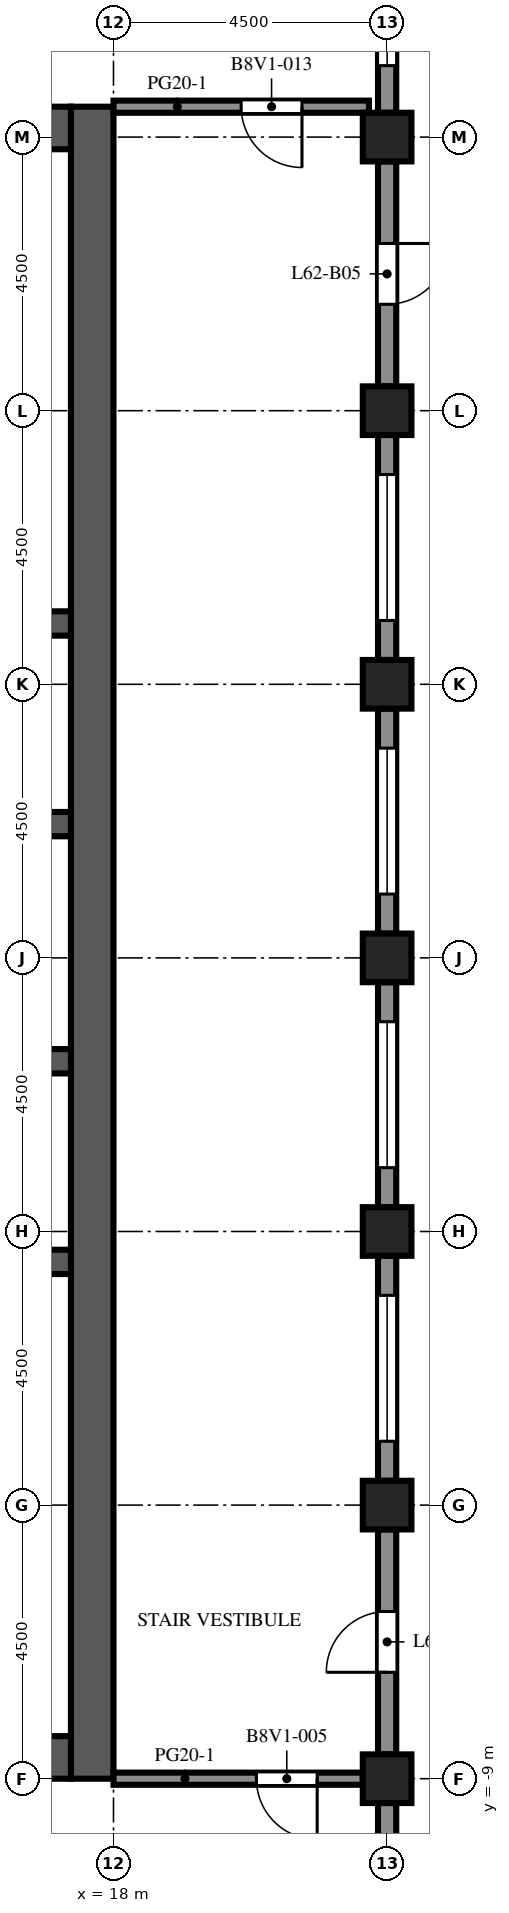
"""IFC4 building model, lengths in metres.
Left out: names, types, materials, properties, quantities, classifications, styles, units other than length and angle.
Written with IfcOpenShell. Run it as: python <this file> out.ifc"""

import sys

from ifc_helpers import new_model, si_unit, direction, frame, frame_2d, origin, origin_2d, place, context, subcontext, project, spatial, rectangle, extrude, element, fill, save


model = new_model("IFC4")
c1 = context("Model", 3, precision=1e-05, world=origin(), true_north=direction((0.0, 1.0)))
c2 = subcontext(c1, "Body", "Model", "MODEL_VIEW")
j1 = project(units=[si_unit("LENGTHUNIT", "METRE"), si_unit("PLANEANGLEUNIT", "RADIAN")], contexts=[c1])
p1 = place(None, origin())
s1 = spatial("IfcSite", under=j1, at=p1, CompositionType="ELEMENT")
p2 = place(p1, origin())
s2 = spatial("IfcBuilding", under=s1, at=p2, CompositionType="ELEMENT")
p3 = place(p2, frame((0.0, 0.0, 274.5)))
s3 = spatial("IfcBuildingStorey", under=s2, at=p3, CompositionType="ELEMENT", Elevation=274.5)
for number, where, z_axis, x_axis in (
    (1, (22.5, -9.0, 0.0), (0.0, 0.0, 1.0), (1.0, 0.0, 0.0)),
    (2, (22.5, -4.5, 0.0), (0.0, 0.0, 1.0), (1.0, 0.0, 0.0)),
    (3, (22.5, 0.0, 0.0), (0.0, 0.0, 1.0), (1.0, 0.0, 0.0)),
    (4, (22.5, 4.5, 0.0), (0.0, 0.0, 1.0), (1.0, 0.0, 0.0)),
    (5, (22.5, 9.0, 0.0), (0.0, 0.0, 1.0), (1.0, 0.0, 0.0)),
    (6, (22.5, 13.5, 0.0), (0.0, 0.0, 1.0), (1.0, 0.0, 0.0)),
    (7, (22.5, 18.0, 0.0), (0.0, 0.0, 1.0), (1.0, 0.0, 0.0)),
):
    element("IfcColumn", number, at=place(p3, frame(where, z_axis=z_axis, x_axis=x_axis)), inside=s3, PredefinedType="COLUMN", context=c2, shape_type="SweptSolid", body=[
        extrude(rectangle(XDim=0.8, YDim=0.8, at=origin_2d()), origin(), (0.0, 0.0, 1.0), 4.1),
    ])
p4 = place(p3, frame((17.65, -9.0, 0.0), z_axis=(0.0, 0.0, 1.0), x_axis=(0.0, 1.0, 0.0)))
e8 = element("IfcWall", 8, at=p4, inside=s3, PredefinedType="SHEAR", context=c2, shape_type="SweptSolid", body=[
    extrude(rectangle(XDim=27.5, YDim=0.7, at=frame_2d((13.75, 0.0))), origin(), (0.0, 0.0, 1.0), 4.1),
])
p5 = place(p4, frame((12.55, 0.0, 0.0)))
e9 = element("IfcOpeningElement", 9, at=p5, cuts=e8, PredefinedType="OPENING", context=c2, shape_type="SweptSolid", body=[
    extrude(rectangle(XDim=2.4, YDim=2.4, at=frame_2d((1.2, 1.2))), frame((0.0, 0.36, 0.0), z_axis=(0.0, -1.0, 0.0), x_axis=(1.0, 0.0, 0.0)), (0.0, 0.0, 1.0), 0.72),
])
p6 = place(p4, frame((6.825, 0.0, 0.0)))
e10 = element("IfcOpeningElement", 10, at=p6, cuts=e8, PredefinedType="OPENING", context=c2, shape_type="SweptSolid", body=[
    extrude(rectangle(XDim=1.2, YDim=2.1, at=frame_2d((0.6, 1.05))), frame((0.0, 0.36, 0.0), z_axis=(0.0, -1.0, 0.0), x_axis=(1.0, 0.0, 0.0)), (0.0, 0.0, 1.0), 0.72),
])
p7 = place(p4, frame((19.475, 0.0, 0.0)))
e11 = element("IfcOpeningElement", 11, at=p7, cuts=e8, PredefinedType="OPENING", context=c2, shape_type="SweptSolid", body=[
    extrude(rectangle(XDim=1.2, YDim=2.1, at=frame_2d((0.6, 1.05))), frame((0.0, 0.36, 0.0), z_axis=(0.0, -1.0, 0.0), x_axis=(1.0, 0.0, 0.0)), (0.0, 0.0, 1.0), 0.72),
])
for number, where, z_axis, x_axis in (
    (12, (6.7, -8.65, 0.0), (0.0, 0.0, 1.0), (1.0, 0.0, 0.0)),
    (13, (6.7, 18.15, 0.0), (0.0, 0.0, 1.0), (1.0, 0.0, 0.0)),
):
    element("IfcWall", number, at=place(p3, frame(where, z_axis=z_axis, x_axis=x_axis)), inside=s3, PredefinedType="SHEAR", context=c2, shape_type="SweptSolid", body=[
        extrude(rectangle(XDim=10.6, YDim=0.7, at=frame_2d((5.3, 0.0))), origin(), (0.0, 0.0, 1.0), 4.1),
    ])
p8 = place(p3, frame((6.7, -0.5, 0.0), z_axis=(0.0, 0.0, 1.0), x_axis=(1.0, 0.0, 0.0)))
e14 = element("IfcWall", 14, at=p8, inside=s3, PredefinedType="SHEAR", context=c2, shape_type="SweptSolid", body=[
    extrude(rectangle(XDim=10.6, YDim=0.4, at=frame_2d((5.3, 0.0))), origin(), (0.0, 0.0, 1.0), 4.1),
])
p9 = place(p3, frame((6.7, 2.8, 0.0), z_axis=(0.0, 0.0, 1.0), x_axis=(1.0, 0.0, 0.0)))
e15 = element("IfcWall", 15, at=p9, inside=s3, PredefinedType="SHEAR", context=c2, shape_type="SweptSolid", body=[
    extrude(rectangle(XDim=10.6, YDim=0.4, at=frame_2d((5.3, 0.0))), origin(), (0.0, 0.0, 1.0), 4.1),
])
p10 = place(p9, frame((0.688, 0.0, 0.0)))
e16 = element("IfcOpeningElement", 16, at=p10, cuts=e15, PredefinedType="OPENING", context=c2, shape_type="SweptSolid", body=[
    extrude(rectangle(XDim=1.1, YDim=2.1, at=frame_2d((0.55, 1.05))), frame((0.0, 0.21, 0.0), z_axis=(0.0, -1.0, 0.0), x_axis=(1.0, 0.0, 0.0)), (0.0, 0.0, 1.0), 0.42),
])
p11 = place(p9, frame((3.438, 0.0, 0.0)))
e17 = element("IfcOpeningElement", 17, at=p11, cuts=e15, PredefinedType="OPENING", context=c2, shape_type="SweptSolid", body=[
    extrude(rectangle(XDim=1.1, YDim=2.1, at=frame_2d((0.55, 1.05))), frame((0.0, 0.21, 0.0), z_axis=(0.0, -1.0, 0.0), x_axis=(1.0, 0.0, 0.0)), (0.0, 0.0, 1.0), 0.42),
])
p12 = place(p9, frame((6.113, 0.0, 0.0)))
e18 = element("IfcOpeningElement", 18, at=p12, cuts=e15, PredefinedType="OPENING", context=c2, shape_type="SweptSolid", body=[
    extrude(rectangle(XDim=1.0, YDim=2.1, at=frame_2d((0.5, 1.05))), frame((0.0, 0.21, 0.0), z_axis=(0.0, -1.0, 0.0), x_axis=(1.0, 0.0, 0.0)), (0.0, 0.0, 1.0), 0.42),
])
p13 = place(p9, frame((8.863, 0.0, 0.0)))
e19 = element("IfcOpeningElement", 19, at=p13, cuts=e15, PredefinedType="OPENING", context=c2, shape_type="SweptSolid", body=[
    extrude(rectangle(XDim=1.0, YDim=2.1, at=frame_2d((0.5, 1.05))), frame((0.0, 0.21, 0.0), z_axis=(0.0, -1.0, 0.0), x_axis=(1.0, 0.0, 0.0)), (0.0, 0.0, 1.0), 0.42),
])
p14 = place(p3, frame((6.7, 6.7, 0.0), z_axis=(0.0, 0.0, 1.0), x_axis=(1.0, 0.0, 0.0)))
e20 = element("IfcWall", 20, at=p14, inside=s3, PredefinedType="SHEAR", context=c2, shape_type="SweptSolid", body=[
    extrude(rectangle(XDim=10.6, YDim=0.4, at=frame_2d((5.3, 0.0))), origin(), (0.0, 0.0, 1.0), 4.1),
])
p15 = place(p14, frame((3.438, 0.0, 0.0)))
e21 = element("IfcOpeningElement", 21, at=p15, cuts=e20, PredefinedType="OPENING", context=c2, shape_type="SweptSolid", body=[
    extrude(rectangle(XDim=1.1, YDim=2.1, at=frame_2d((0.55, 1.05))), frame((0.0, 0.21, 0.0), z_axis=(0.0, -1.0, 0.0), x_axis=(1.0, 0.0, 0.0)), (0.0, 0.0, 1.0), 0.42),
])
p16 = place(p14, frame((6.062, 0.0, 0.0)))
e22 = element("IfcOpeningElement", 22, at=p16, cuts=e20, PredefinedType="OPENING", context=c2, shape_type="SweptSolid", body=[
    extrude(rectangle(XDim=1.1, YDim=2.1, at=frame_2d((0.55, 1.05))), frame((0.0, 0.21, 0.0), z_axis=(0.0, -1.0, 0.0), x_axis=(1.0, 0.0, 0.0)), (0.0, 0.0, 1.0), 0.42),
])
p17 = place(p14, frame((8.812, 0.0, 0.0)))
e23 = element("IfcOpeningElement", 23, at=p17, cuts=e20, PredefinedType="OPENING", context=c2, shape_type="SweptSolid", body=[
    extrude(rectangle(XDim=1.1, YDim=2.1, at=frame_2d((0.55, 1.05))), frame((0.0, 0.21, 0.0), z_axis=(0.0, -1.0, 0.0), x_axis=(1.0, 0.0, 0.0)), (0.0, 0.0, 1.0), 0.42),
])
p18 = place(p14, frame((0.738, 0.0, 0.0)))
e24 = element("IfcOpeningElement", 24, at=p18, cuts=e20, PredefinedType="OPENING", context=c2, shape_type="SweptSolid", body=[
    extrude(rectangle(XDim=1.0, YDim=2.1, at=frame_2d((0.5, 1.05))), frame((0.0, 0.21, 0.0), z_axis=(0.0, -1.0, 0.0), x_axis=(1.0, 0.0, 0.0)), (0.0, 0.0, 1.0), 0.42),
])
p19 = place(p3, frame((6.7, 10.0, 0.0), z_axis=(0.0, 0.0, 1.0), x_axis=(1.0, 0.0, 0.0)))
e25 = element("IfcWall", 25, at=p19, inside=s3, PredefinedType="SHEAR", context=c2, shape_type="SweptSolid", body=[
    extrude(rectangle(XDim=10.6, YDim=0.4, at=frame_2d((5.3, 0.0))), origin(), (0.0, 0.0, 1.0), 4.1),
])
p20 = place(p3, frame((22.5, -9.4, 0.0), z_axis=(0.0, 0.0, 1.0), x_axis=(0.0, -1.0, 0.0)))
e26 = element("IfcWall", 26, at=p20, inside=s3, PredefinedType="SOLIDWALL", context=c2, shape_type="SweptSolid", body=[
    extrude(rectangle(XDim=3.7, YDim=0.3, at=frame_2d((1.85, 0.0))), origin(), (0.0, 0.0, 1.0), 2.85),
])
p21 = place(p20, frame((0.65, 0.0, 0.8)))
e27 = element("IfcOpeningElement", 27, at=p21, cuts=e26, PredefinedType="OPENING", context=c2, shape_type="SweptSolid", body=[
    extrude(rectangle(XDim=2.4, YDim=1.7, at=frame_2d((1.2, 0.85))), frame((0.0, 0.16, 0.0), z_axis=(0.0, -1.0, 0.0), x_axis=(1.0, 0.0, 0.0)), (0.0, 0.0, 1.0), 0.32),
])
p22 = place(p3, frame((22.5, -4.9, 0.0), z_axis=(0.0, 0.0, 1.0), x_axis=(0.0, -1.0, 0.0)))
e28 = element("IfcWall", 28, at=p22, inside=s3, PredefinedType="SOLIDWALL", context=c2, shape_type="SweptSolid", body=[
    extrude(rectangle(XDim=3.7, YDim=0.3, at=frame_2d((1.85, 0.0))), origin(), (0.0, 0.0, 1.0), 2.85),
])
p23 = place(p22, frame((1.35, 0.0, 0.0)))
e29 = element("IfcOpeningElement", 29, at=p23, cuts=e28, PredefinedType="OPENING", context=c2, shape_type="SweptSolid", body=[
    extrude(rectangle(XDim=1.0, YDim=2.2, at=frame_2d((0.5, 1.1))), frame((0.0, 0.16, 0.0), z_axis=(0.0, -1.0, 0.0), x_axis=(1.0, 0.0, 0.0)), (0.0, 0.0, 1.0), 0.32),
])
p24 = place(p3, frame((22.5, -0.4, 0.0), z_axis=(0.0, 0.0, 1.0), x_axis=(0.0, -1.0, 0.0)))
e30 = element("IfcWall", 30, at=p24, inside=s3, PredefinedType="SOLIDWALL", context=c2, shape_type="SweptSolid", body=[
    extrude(rectangle(XDim=3.7, YDim=0.3, at=frame_2d((1.85, 0.0))), origin(), (0.0, 0.0, 1.0), 2.85),
])
p25 = place(p24, frame((0.65, 0.0, 0.8)))
e31 = element("IfcOpeningElement", 31, at=p25, cuts=e30, PredefinedType="OPENING", context=c2, shape_type="SweptSolid", body=[
    extrude(rectangle(XDim=2.4, YDim=1.7, at=frame_2d((1.2, 0.85))), frame((0.0, 0.16, 0.0), z_axis=(0.0, -1.0, 0.0), x_axis=(1.0, 0.0, 0.0)), (0.0, 0.0, 1.0), 0.32),
])
p26 = place(p3, frame((22.5, 4.1, 0.0), z_axis=(0.0, 0.0, 1.0), x_axis=(0.0, -1.0, 0.0)))
e32 = element("IfcWall", 32, at=p26, inside=s3, PredefinedType="SOLIDWALL", context=c2, shape_type="SweptSolid", body=[
    extrude(rectangle(XDim=3.7, YDim=0.3, at=frame_2d((1.85, 0.0))), origin(), (0.0, 0.0, 1.0), 2.85),
])
p27 = place(p26, frame((0.65, 0.0, 0.8)))
e33 = element("IfcOpeningElement", 33, at=p27, cuts=e32, PredefinedType="OPENING", context=c2, shape_type="SweptSolid", body=[
    extrude(rectangle(XDim=2.4, YDim=1.7, at=frame_2d((1.2, 0.85))), frame((0.0, 0.16, 0.0), z_axis=(0.0, -1.0, 0.0), x_axis=(1.0, 0.0, 0.0)), (0.0, 0.0, 1.0), 0.32),
])
p28 = place(p3, frame((22.5, 8.6, 0.0), z_axis=(0.0, 0.0, 1.0), x_axis=(0.0, -1.0, 0.0)))
e34 = element("IfcWall", 34, at=p28, inside=s3, PredefinedType="SOLIDWALL", context=c2, shape_type="SweptSolid", body=[
    extrude(rectangle(XDim=3.7, YDim=0.3, at=frame_2d((1.85, 0.0))), origin(), (0.0, 0.0, 1.0), 2.85),
])
p29 = place(p28, frame((0.65, 0.0, 0.8)))
e35 = element("IfcOpeningElement", 35, at=p29, cuts=e34, PredefinedType="OPENING", context=c2, shape_type="SweptSolid", body=[
    extrude(rectangle(XDim=2.4, YDim=1.7, at=frame_2d((1.2, 0.85))), frame((0.0, 0.16, 0.0), z_axis=(0.0, -1.0, 0.0), x_axis=(1.0, 0.0, 0.0)), (0.0, 0.0, 1.0), 0.32),
])
p30 = place(p3, frame((22.5, 13.1, 0.0), z_axis=(0.0, 0.0, 1.0), x_axis=(0.0, -1.0, 0.0)))
e36 = element("IfcWall", 36, at=p30, inside=s3, PredefinedType="SOLIDWALL", context=c2, shape_type="SweptSolid", body=[
    extrude(rectangle(XDim=3.7, YDim=0.3, at=frame_2d((1.85, 0.0))), origin(), (0.0, 0.0, 1.0), 2.85),
])
p31 = place(p30, frame((0.65, 0.0, 0.8)))
e37 = element("IfcOpeningElement", 37, at=p31, cuts=e36, PredefinedType="OPENING", context=c2, shape_type="SweptSolid", body=[
    extrude(rectangle(XDim=2.4, YDim=1.7, at=frame_2d((1.2, 0.85))), frame((0.0, 0.16, 0.0), z_axis=(0.0, -1.0, 0.0), x_axis=(1.0, 0.0, 0.0)), (0.0, 0.0, 1.0), 0.32),
])
p32 = place(p3, frame((22.5, 17.6, 0.0), z_axis=(0.0, 0.0, 1.0), x_axis=(0.0, -1.0, 0.0)))
e38 = element("IfcWall", 38, at=p32, inside=s3, PredefinedType="SOLIDWALL", context=c2, shape_type="SweptSolid", body=[
    extrude(rectangle(XDim=3.7, YDim=0.3, at=frame_2d((1.85, 0.0))), origin(), (0.0, 0.0, 1.0), 2.85),
])
p33 = place(p32, frame((1.35, 0.0, 0.0)))
e39 = element("IfcOpeningElement", 39, at=p33, cuts=e38, PredefinedType="OPENING", context=c2, shape_type="SweptSolid", body=[
    extrude(rectangle(XDim=1.0, YDim=2.2, at=frame_2d((0.5, 1.1))), frame((0.0, 0.16, 0.0), z_axis=(0.0, -1.0, 0.0), x_axis=(1.0, 0.0, 0.0)), (0.0, 0.0, 1.0), 0.32),
])
p34 = place(p3, frame((22.5, 22.1, 0.0), z_axis=(0.0, 0.0, 1.0), x_axis=(0.0, -1.0, 0.0)))
e40 = element("IfcWall", 40, at=p34, inside=s3, PredefinedType="SOLIDWALL", context=c2, shape_type="SweptSolid", body=[
    extrude(rectangle(XDim=3.7, YDim=0.3, at=frame_2d((1.85, 0.0))), origin(), (0.0, 0.0, 1.0), 2.85),
])
p35 = place(p34, frame((0.525, 0.0, 0.8)))
e41 = element("IfcOpeningElement", 41, at=p35, cuts=e40, PredefinedType="OPENING", context=c2, shape_type="SweptSolid", body=[
    extrude(rectangle(XDim=2.4, YDim=1.7, at=frame_2d((1.2, 0.85))), frame((0.0, 0.16, 0.0), z_axis=(0.0, -1.0, 0.0), x_axis=(1.0, 0.0, 0.0)), (0.0, 0.0, 1.0), 0.32),
])
p36 = place(p3, frame((22.1, -9.0, 0.0), z_axis=(0.0, 0.0, 1.0), x_axis=(-1.0, 0.0, 0.0)))
e42 = element("IfcWall", 42, at=p36, inside=s3, PredefinedType="PARTITIONING", context=c2, shape_type="SweptSolid", body=[
    extrude(rectangle(XDim=4.1, YDim=0.2, at=frame_2d((2.05, 0.0))), origin(), (0.0, 0.0, 1.0), 3.65),
])
p37 = place(p36, frame((0.75, 0.0, 0.0)))
e43 = element("IfcOpeningElement", 43, at=p37, cuts=e42, PredefinedType="OPENING", context=c2, shape_type="SweptSolid", body=[
    extrude(rectangle(XDim=1.0, YDim=2.1, at=frame_2d((0.5, 1.05))), frame((0.0, 0.11, 0.0), z_axis=(0.0, -1.0, 0.0), x_axis=(1.0, 0.0, 0.0)), (0.0, 0.0, 1.0), 0.22),
])
p38 = place(p3, frame((18.0, 18.5, 0.0), z_axis=(0.0, 0.0, 1.0), x_axis=(1.0, 0.0, 0.0)))
e44 = element("IfcWall", 44, at=p38, inside=s3, PredefinedType="PARTITIONING", context=c2, shape_type="SweptSolid", body=[
    extrude(rectangle(XDim=4.201, YDim=0.2, at=frame_2d((2.101, 0.0))), origin(), (0.0, 0.0, 1.0), 3.65),
])
p39 = place(p38, frame((2.1, 0.0, 0.0)))
e45 = element("IfcOpeningElement", 45, at=p39, cuts=e44, PredefinedType="OPENING", context=c2, shape_type="SweptSolid", body=[
    extrude(rectangle(XDim=1.0, YDim=2.1, at=frame_2d((0.5, 1.05))), frame((0.0, 0.11, 0.0), z_axis=(0.0, -1.0, 0.0), x_axis=(1.0, 0.0, 0.0)), (0.0, 0.0, 1.0), 0.22),
])
p40 = place(p23, origin())
e46 = element("IfcDoor", 46, at=p40, inside=s3, OperationType="SINGLE_SWING_RIGHT", PredefinedType="DOOR", context=c2, shape_type="SweptSolid", body=[
    extrude(rectangle(XDim=1.0, YDim=2.2, at=frame_2d((0.5, 1.1))), frame((0.0, 0.025, 0.0), z_axis=(0.0, -1.0, 0.0), x_axis=(1.0, 0.0, 0.0)), (0.0, 0.0, 1.0), 0.05),
])
fill(e29, e46)
p41 = place(p25, origin())
e47 = element("IfcWindow", 47, at=p41, inside=s3, PartitioningType="SINGLE_PANEL", PredefinedType="WINDOW", context=c2, shape_type="SweptSolid", body=[
    extrude(rectangle(XDim=2.4, YDim=1.7, at=frame_2d((1.2, 0.85))), frame((0.0, 0.03, 0.0), z_axis=(0.0, -1.0, 0.0), x_axis=(1.0, 0.0, 0.0)), (0.0, 0.0, 1.0), 0.06),
])
fill(e31, e47)
p42 = place(p27, origin())
e48 = element("IfcWindow", 48, at=p42, inside=s3, PartitioningType="SINGLE_PANEL", PredefinedType="WINDOW", context=c2, shape_type="SweptSolid", body=[
    extrude(rectangle(XDim=2.4, YDim=1.7, at=frame_2d((1.2, 0.85))), frame((0.0, 0.03, 0.0), z_axis=(0.0, -1.0, 0.0), x_axis=(1.0, 0.0, 0.0)), (0.0, 0.0, 1.0), 0.06),
])
fill(e33, e48)
p43 = place(p29, origin())
e49 = element("IfcWindow", 49, at=p43, inside=s3, PartitioningType="SINGLE_PANEL", PredefinedType="WINDOW", context=c2, shape_type="SweptSolid", body=[
    extrude(rectangle(XDim=2.4, YDim=1.7, at=frame_2d((1.2, 0.85))), frame((0.0, 0.03, 0.0), z_axis=(0.0, -1.0, 0.0), x_axis=(1.0, 0.0, 0.0)), (0.0, 0.0, 1.0), 0.06),
])
fill(e35, e49)
p44 = place(p31, origin())
e50 = element("IfcWindow", 50, at=p44, inside=s3, PartitioningType="SINGLE_PANEL", PredefinedType="WINDOW", context=c2, shape_type="SweptSolid", body=[
    extrude(rectangle(XDim=2.4, YDim=1.7, at=frame_2d((1.2, 0.85))), frame((0.0, 0.03, 0.0), z_axis=(0.0, -1.0, 0.0), x_axis=(1.0, 0.0, 0.0)), (0.0, 0.0, 1.0), 0.06),
])
fill(e37, e50)
p45 = place(p33, origin())
e51 = element("IfcDoor", 51, at=p45, inside=s3, OperationType="SINGLE_SWING_LEFT", PredefinedType="DOOR", context=c2, shape_type="SweptSolid", body=[
    extrude(rectangle(XDim=1.0, YDim=2.2, at=frame_2d((0.5, 1.1))), frame((0.0, 0.025, 0.0), z_axis=(0.0, -1.0, 0.0), x_axis=(1.0, 0.0, 0.0)), (0.0, 0.0, 1.0), 0.05),
])
fill(e39, e51)
p46 = place(p35, origin())
e52 = element("IfcWindow", 52, at=p46, inside=s3, PartitioningType="SINGLE_PANEL", PredefinedType="WINDOW", context=c2, shape_type="SweptSolid", body=[
    extrude(rectangle(XDim=2.4, YDim=1.7, at=frame_2d((1.2, 0.85))), frame((0.0, 0.03, 0.0), z_axis=(0.0, -1.0, 0.0), x_axis=(1.0, 0.0, 0.0)), (0.0, 0.0, 1.0), 0.06),
])
fill(e41, e52)
p47 = place(p5, origin())
e53 = element("IfcDoor", 53, at=p47, inside=s3, OperationType="DOUBLE_DOOR_DOUBLE_SWING", PredefinedType="DOOR", context=c2, shape_type="SweptSolid", body=[
    extrude(rectangle(XDim=2.4, YDim=2.4, at=frame_2d((1.2, 1.2))), frame((0.0, 0.025, 0.0), z_axis=(0.0, -1.0, 0.0), x_axis=(1.0, 0.0, 0.0)), (0.0, 0.0, 1.0), 0.05),
])
fill(e9, e53)
p48 = place(p6, frame((1.2, 0.0, 0.0), z_axis=(0.0, 0.0, 1.0), x_axis=(-1.0, 0.0, 0.0)))
e54 = element("IfcDoor", 54, at=p48, inside=s3, OperationType="SINGLE_SWING_LEFT", PredefinedType="DOOR", context=c2, shape_type="SweptSolid", body=[
    extrude(rectangle(XDim=1.2, YDim=2.1, at=frame_2d((0.6, 1.05))), frame((0.0, 0.025, 0.0), z_axis=(0.0, -1.0, 0.0), x_axis=(1.0, 0.0, 0.0)), (0.0, 0.0, 1.0), 0.05),
])
fill(e10, e54)
p49 = place(p7, frame((1.2, 0.0, 0.0), z_axis=(0.0, 0.0, 1.0), x_axis=(-1.0, 0.0, 0.0)))
e55 = element("IfcDoor", 55, at=p49, inside=s3, OperationType="SINGLE_SWING_LEFT", PredefinedType="DOOR", context=c2, shape_type="SweptSolid", body=[
    extrude(rectangle(XDim=1.2, YDim=2.1, at=frame_2d((0.6, 1.05))), frame((0.0, 0.025, 0.0), z_axis=(0.0, -1.0, 0.0), x_axis=(1.0, 0.0, 0.0)), (0.0, 0.0, 1.0), 0.05),
])
fill(e11, e55)
p50 = place(p37, origin())
e56 = element("IfcDoor", 56, at=p50, inside=s3, OperationType="SINGLE_SWING_LEFT", PredefinedType="DOOR", context=c2, shape_type="SweptSolid", body=[
    extrude(rectangle(XDim=1.0, YDim=2.1, at=frame_2d((0.5, 1.05))), frame((0.0, 0.025, 0.0), z_axis=(0.0, -1.0, 0.0), x_axis=(1.0, 0.0, 0.0)), (0.0, 0.0, 1.0), 0.05),
])
fill(e43, e56)
p51 = place(p39, origin())
e57 = element("IfcDoor", 57, at=p51, inside=s3, OperationType="SINGLE_SWING_RIGHT", PredefinedType="DOOR", context=c2, shape_type="SweptSolid", body=[
    extrude(rectangle(XDim=1.0, YDim=2.1, at=frame_2d((0.5, 1.05))), frame((0.0, 0.025, 0.0), z_axis=(0.0, -1.0, 0.0), x_axis=(1.0, 0.0, 0.0)), (0.0, 0.0, 1.0), 0.05),
])
fill(e45, e57)
save(model, sys.argv[1])
